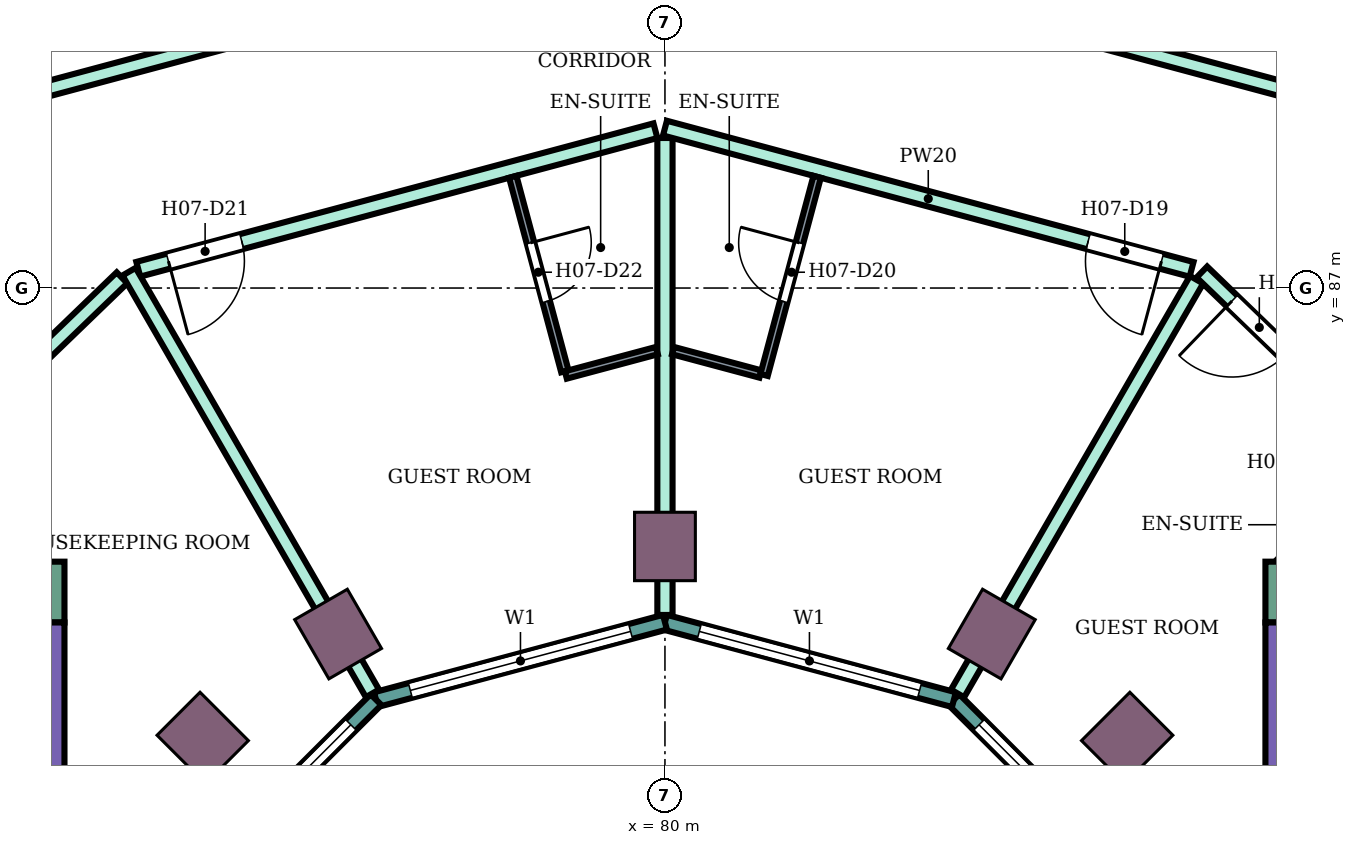
"""IFC4 building model, lengths in metres.
Left out: names, types, materials, properties, quantities, classifications, styles, units other than length and angle.
Written with IfcOpenShell. Run it as: python <this file> out.ifc"""

import sys

from ifc_helpers import new_model, si_unit, direction, frame, frame_2d, origin, origin_2d, place, context, subcontext, project, spatial, rectangle, extrude, element, fill, save


model = new_model("IFC4")
c1 = context("Model", 3, precision=1e-05, world=origin(), true_north=direction((0.0, 1.0)))
c2 = subcontext(c1, "Body", "Model", "MODEL_VIEW")
j1 = project(units=[si_unit("LENGTHUNIT", "METRE"), si_unit("PLANEANGLEUNIT", "RADIAN")], contexts=[c1])
p1 = place(None, origin())
s1 = spatial("IfcSite", under=j1, at=p1, CompositionType="ELEMENT")
p2 = place(p1, origin())
s2 = spatial("IfcBuilding", under=s1, at=p2, CompositionType="ELEMENT")
p3 = place(p2, frame((0.0, 0.0, 105.2)))
s3 = spatial("IfcBuildingStorey", under=s2, at=p3, CompositionType="ELEMENT", Elevation=105.2)
for number, where, z_axis, x_axis in (
    (1, (86.081, 81.081, 0.0), (0.0, 0.0, 1.0), (0.707, 0.707, 0.0)),
    (2, (84.3, 82.448, 0.0), (0.0, 0.0, 1.0), (0.5, 0.866, 0.0)),
    (3, (80.0, 83.6, 0.0), (0.0, 0.0, 1.0), (0.0, 1.0, 0.0)),
    (4, (75.7, 82.448, 0.0), (0.0, 0.0, 1.0), (-0.5, 0.866, 0.0)),
    (5, (73.919, 81.081, 0.0), (0.0, 0.0, 1.0), (-0.707, 0.707, 0.0)),
):
    element("IfcColumn", number, at=place(p3, frame(where, z_axis=z_axis, x_axis=x_axis)), inside=s3, PredefinedType="COLUMN", context=c2, shape_type="SweptSolid", body=[
        extrude(rectangle(XDim=0.9, YDim=0.8, at=origin_2d()), origin(), (0.0, 0.0, 1.0), 3.8),
    ])
p4 = place(p3, frame((87.9, 83.0, 0.0), z_axis=(0.0, 0.0, 1.0), x_axis=(1.0, 0.0, 0.0)))
e6 = element("IfcWall", 6, at=p4, inside=s3, PredefinedType="SHEAR", context=c2, shape_type="SweptSolid", body=[
    extrude(rectangle(XDim=14.7, YDim=0.8, at=frame_2d((7.35, 0.0))), origin(), (0.0, 0.0, 1.0), 3.45),
])
p5 = place(p4, frame((4.2, 0.0, 0.0)))
e7 = element("IfcOpeningElement", 7, at=p5, cuts=e6, PredefinedType="OPENING", context=c2, shape_type="SweptSolid", body=[
    extrude(rectangle(XDim=2.4, YDim=2.4, at=frame_2d((1.2, 1.2))), frame((0.0, 0.41, 0.0), z_axis=(0.0, -1.0, 0.0), x_axis=(1.0, 0.0, 0.0)), (0.0, 0.0, 1.0), 0.82),
])
p6 = place(p3, frame((88.125, 75.0, 0.0), z_axis=(0.0, 0.0, 1.0), x_axis=(0.0, 1.0, 0.0)))
e8 = element("IfcWall", 8, at=p6, inside=s3, PredefinedType="SHEAR", context=c2, shape_type="SweptSolid", body=[
    extrude(rectangle(XDim=7.6, YDim=0.45, at=frame_2d((3.8, 0.0))), origin(), (0.0, 0.0, 1.0), 3.45),
])
p7 = place(p3, frame((72.1, 83.0, 0.0), z_axis=(0.0, 0.0, 1.0), x_axis=(-1.0, 0.0, 0.0)))
e9 = element("IfcWall", 9, at=p7, inside=s3, PredefinedType="SHEAR", context=c2, shape_type="SweptSolid", body=[
    extrude(rectangle(XDim=14.7, YDim=0.8, at=frame_2d((7.35, 0.0))), origin(), (0.0, 0.0, 1.0), 3.45),
])
p8 = place(p7, frame((4.2, 0.0, 0.0)))
e10 = element("IfcOpeningElement", 10, at=p8, cuts=e9, PredefinedType="OPENING", context=c2, shape_type="SweptSolid", body=[
    extrude(rectangle(XDim=2.4, YDim=2.4, at=frame_2d((1.2, 1.2))), frame((0.0, 0.41, 0.0), z_axis=(0.0, -1.0, 0.0), x_axis=(1.0, 0.0, 0.0)), (0.0, 0.0, 1.0), 0.82),
])
p9 = place(p3, frame((71.875, 82.6, 0.0), z_axis=(0.0, 0.0, 1.0), x_axis=(0.0, -1.0, 0.0)))
e11 = element("IfcWall", 11, at=p9, inside=s3, PredefinedType="SHEAR", context=c2, shape_type="SweptSolid", body=[
    extrude(rectangle(XDim=7.6, YDim=0.45, at=frame_2d((3.8, 0.0))), origin(), (0.0, 0.0, 1.0), 3.45),
])
p10 = place(p3, frame((86.585, 78.802, 0.0), z_axis=(0.0, 0.0, 1.0), x_axis=(-0.707106781187, 0.707106781187, 0.0)))
e12 = element("IfcWall", 12, at=p10, inside=s3, PredefinedType="NOTDEFINED", context=c2, shape_type="SweptSolid", body=[
    extrude(rectangle(XDim=3.936, YDim=0.2, at=frame_2d((1.968, 0.0))), origin(), (0.0, 0.0, 1.0), 3.8),
])
p11 = place(p10, frame((0.468, 0.0, 0.9)))
e13 = element("IfcOpeningElement", 13, at=p11, cuts=e12, PredefinedType="OPENING", context=c2, shape_type="SweptSolid", body=[
    extrude(rectangle(XDim=3.0, YDim=2.3, at=frame_2d((1.5, 1.15))), frame((0.0, 0.11, 0.0), z_axis=(0.0, -1.0, 0.0), x_axis=(1.0, 0.0, 0.0)), (0.0, 0.0, 1.0), 0.22),
])
p12 = place(p3, frame((83.802, 81.585, 0.0), z_axis=(0.0, 0.0, 1.0), x_axis=(-0.965933654434, 0.258789828301, 0.0)))
e14 = element("IfcWall", 14, at=p12, inside=s3, PredefinedType="NOTDEFINED", context=c2, shape_type="SweptSolid", body=[
    extrude(rectangle(XDim=3.936, YDim=0.2, at=frame_2d((1.968, 0.0))), origin(), (0.0, 0.0, 1.0), 3.8),
])
p13 = place(p12, frame((0.468, 0.0, 0.9)))
e15 = element("IfcOpeningElement", 15, at=p13, cuts=e14, PredefinedType="OPENING", context=c2, shape_type="SweptSolid", body=[
    extrude(rectangle(XDim=3.0, YDim=2.3, at=frame_2d((1.5, 1.15))), frame((0.0, 0.11, 0.0), z_axis=(0.0, -1.0, 0.0), x_axis=(1.0, 0.0, 0.0)), (0.0, 0.0, 1.0), 0.22),
])
p14 = place(p3, frame((80.0, 82.604, 0.0), z_axis=(0.0, 0.0, 1.0), x_axis=(-0.965933654434, -0.258789828301, 0.0)))
e16 = element("IfcWall", 16, at=p14, inside=s3, PredefinedType="NOTDEFINED", context=c2, shape_type="SweptSolid", body=[
    extrude(rectangle(XDim=3.936, YDim=0.2, at=frame_2d((1.968, 0.0))), origin(), (0.0, 0.0, 1.0), 3.8),
])
p15 = place(p14, frame((0.468, 0.0, 0.9)))
e17 = element("IfcOpeningElement", 17, at=p15, cuts=e16, PredefinedType="OPENING", context=c2, shape_type="SweptSolid", body=[
    extrude(rectangle(XDim=3.0, YDim=2.3, at=frame_2d((1.5, 1.15))), frame((0.0, 0.11, 0.0), z_axis=(0.0, -1.0, 0.0), x_axis=(1.0, 0.0, 0.0)), (0.0, 0.0, 1.0), 0.22),
])
p16 = place(p3, frame((76.198, 81.585, 0.0), z_axis=(0.0, 0.0, 1.0), x_axis=(-0.707106781187, -0.707106781187, 0.0)))
e18 = element("IfcWall", 18, at=p16, inside=s3, PredefinedType="NOTDEFINED", context=c2, shape_type="SweptSolid", body=[
    extrude(rectangle(XDim=3.936, YDim=0.2, at=frame_2d((1.968, 0.0))), origin(), (0.0, 0.0, 1.0), 3.8),
])
p17 = place(p16, frame((0.468, 0.0, 0.9)))
e19 = element("IfcOpeningElement", 19, at=p17, cuts=e18, PredefinedType="OPENING", context=c2, shape_type="SweptSolid", body=[
    extrude(rectangle(XDim=3.0, YDim=2.3, at=frame_2d((1.5, 1.15))), frame((0.0, 0.11, 0.0), z_axis=(0.0, -1.0, 0.0), x_axis=(1.0, 0.0, 0.0)), (0.0, 0.0, 1.0), 0.22),
])
p18 = place(p3, frame((68.987, 83.4, 0.0), z_axis=(0.0, 0.0, 1.0), x_axis=(0.719547721855, 0.694442996922, 0.0)))
e20 = element("IfcWall", 20, at=p18, inside=s3, PredefinedType="PARTITIONING", context=c2, shape_type="SweptSolid", body=[
    extrude(rectangle(XDim=5.378, YDim=0.2, at=frame_2d((2.689, 0.0))), origin(), (0.0, 0.0, 1.0), 3.35),
])
p19 = place(p18, frame((2.294, 0.0, 0.0)))
e21 = element("IfcOpeningElement", 21, at=p19, cuts=e20, PredefinedType="OPENING", context=c2, shape_type="SweptSolid", body=[
    extrude(rectangle(XDim=0.9, YDim=2.1, at=frame_2d((0.45, 1.05))), frame((0.0, 0.11, 0.0), z_axis=(0.0, -1.0, 0.0), x_axis=(1.0, 0.0, 0.0)), (0.0, 0.0, 1.0), 0.22),
])
p20 = place(p3, frame((71.614, 89.55, 0.0), z_axis=(0.0, 0.0, 1.0), x_axis=(0.96597505802, 0.258635239832, 0.0)))
e22 = element("IfcWall", 22, at=p20, inside=s3, PredefinedType="PARTITIONING", context=c2, shape_type="SweptSolid", body=[
    extrude(rectangle(XDim=8.592, YDim=0.2, at=frame_2d((4.296, 0.0))), origin(), (0.0, 0.0, 1.0), 3.35),
])
p21 = place(p20, frame((4.865, 0.0, 0.0)))
e23 = element("IfcOpeningElement", 23, at=p21, cuts=e22, PredefinedType="OPENING", context=c2, shape_type="SweptSolid", body=[
    extrude(rectangle(XDim=1.0, YDim=2.1, at=frame_2d((0.5, 1.05))), frame((0.0, 0.11, 0.0), z_axis=(0.0, -1.0, 0.0), x_axis=(1.0, 0.0, 0.0)), (0.0, 0.0, 1.0), 0.22),
])
p22 = place(p20, frame((2.804, 0.0, 0.0)))
e24 = element("IfcOpeningElement", 24, at=p22, cuts=e22, PredefinedType="OPENING", context=c2, shape_type="SweptSolid", body=[
    extrude(rectangle(XDim=1.0, YDim=2.1, at=frame_2d((0.5, 1.05))), frame((0.0, 0.11, 0.0), z_axis=(0.0, -1.0, 0.0), x_axis=(1.0, 0.0, 0.0)), (0.0, 0.0, 1.0), 0.22),
])
p23 = place(p3, frame((73.071, 87.247, 0.0), z_axis=(0.0, 0.0, 1.0), x_axis=(0.965931651205, 0.258797305243, 0.0)))
e25 = element("IfcWall", 25, at=p23, inside=s3, PredefinedType="PARTITIONING", context=c2, shape_type="SweptSolid", body=[
    extrude(rectangle(XDim=7.043, YDim=0.2, at=frame_2d((3.521, 0.0))), origin(), (0.0, 0.0, 1.0), 3.35),
])
p24 = place(p23, frame((0.41, 0.0, 0.0)))
e26 = element("IfcOpeningElement", 26, at=p24, cuts=e25, PredefinedType="OPENING", context=c2, shape_type="SweptSolid", body=[
    extrude(rectangle(XDim=1.0, YDim=2.1, at=frame_2d((0.5, 1.05))), frame((0.0, 0.11, 0.0), z_axis=(0.0, -1.0, 0.0), x_axis=(1.0, 0.0, 0.0)), (0.0, 0.0, 1.0), 0.22),
])
p25 = place(p3, frame((72.95, 87.215, 0.0), z_axis=(0.0, 0.0, 1.0), x_axis=(0.499881928498, -0.866093561667, 0.0)))
e27 = element("IfcWall", 27, at=p25, inside=s3, PredefinedType="PARTITIONING", context=c2, shape_type="SweptSolid", body=[
    extrude(rectangle(XDim=6.405, YDim=0.2, at=frame_2d((3.203, 0.0))), origin(), (0.0, 0.0, 1.0), 3.35),
])
p26 = place(p3, frame((80.0, 82.699, 0.0), z_axis=(0.0, 0.0, 1.0), x_axis=(0.0, 1.0, 0.0)))
e28 = element("IfcWall", 28, at=p26, inside=s3, PredefinedType="PARTITIONING", context=c2, shape_type="SweptSolid", body=[
    extrude(rectangle(XDim=6.275, YDim=0.2, at=frame_2d((3.138, 0.0))), origin(), (0.0, 0.0, 1.0), 3.35),
])
p27 = place(p3, frame((80.0, 89.104, 0.0), z_axis=(0.0, 0.0, 1.0), x_axis=(0.965856548257, -0.259077455964, 0.0)))
e29 = element("IfcWall", 29, at=p27, inside=s3, PredefinedType="PARTITIONING", context=c2, shape_type="SweptSolid", body=[
    extrude(rectangle(XDim=7.173, YDim=0.2, at=frame_2d((3.586, 0.0))), origin(), (0.0, 0.0, 1.0), 3.35),
])
p28 = place(p27, frame((5.763, 0.0, 0.0)))
e30 = element("IfcOpeningElement", 30, at=p28, cuts=e29, PredefinedType="OPENING", context=c2, shape_type="SweptSolid", body=[
    extrude(rectangle(XDim=1.0, YDim=2.1, at=frame_2d((0.5, 1.05))), frame((0.0, 0.11, 0.0), z_axis=(0.0, -1.0, 0.0), x_axis=(1.0, 0.0, 0.0)), (0.0, 0.0, 1.0), 0.22),
])
p29 = place(p3, frame((80.0, 91.797, 0.0), z_axis=(0.0, 0.0, 1.0), x_axis=(0.965857042792, -0.259075612301, 0.0)))
e31 = element("IfcWall", 31, at=p29, inside=s3, PredefinedType="PARTITIONING", context=c2, shape_type="SweptSolid", body=[
    extrude(rectangle(XDim=8.602, YDim=0.2, at=frame_2d((4.301, 0.0))), origin(), (0.0, 0.0, 1.0), 3.35),
])
p30 = place(p29, frame((4.877, 0.0, 0.0)))
e32 = element("IfcOpeningElement", 32, at=p30, cuts=e31, PredefinedType="OPENING", context=c2, shape_type="SweptSolid", body=[
    extrude(rectangle(XDim=1.0, YDim=2.1, at=frame_2d((0.5, 1.05))), frame((0.0, 0.11, 0.0), z_axis=(0.0, -1.0, 0.0), x_axis=(1.0, 0.0, 0.0)), (0.0, 0.0, 1.0), 0.22),
])
p31 = place(p29, frame((1.683, 0.0, 0.0)))
e33 = element("IfcOpeningElement", 33, at=p31, cuts=e31, PredefinedType="OPENING", context=c2, shape_type="SweptSolid", body=[
    extrude(rectangle(XDim=1.0, YDim=2.1, at=frame_2d((0.5, 1.05))), frame((0.0, 0.11, 0.0), z_axis=(0.0, -1.0, 0.0), x_axis=(1.0, 0.0, 0.0)), (0.0, 0.0, 1.0), 0.22),
])
p32 = place(p3, frame((83.85, 81.667, 0.0), z_axis=(0.0, 0.0, 1.0), x_axis=(0.500224530691, 0.865895732115, 0.0)))
e34 = element("IfcWall", 34, at=p32, inside=s3, PredefinedType="PARTITIONING", context=c2, shape_type="SweptSolid", body=[
    extrude(rectangle(XDim=6.285, YDim=0.2, at=frame_2d((3.143, 0.0))), origin(), (0.0, 0.0, 1.0), 3.35),
])
p33 = place(p3, frame((87.064, 87.211, 0.0), z_axis=(0.0, 0.0, 1.0), x_axis=(0.719540958932, -0.694450004262, 0.0)))
e35 = element("IfcWall", 35, at=p33, inside=s3, PredefinedType="PARTITIONING", context=c2, shape_type="SweptSolid", body=[
    extrude(rectangle(XDim=5.488, YDim=0.2, at=frame_2d((2.744, 0.0))), origin(), (0.0, 0.0, 1.0), 3.35),
])
p34 = place(p33, frame((0.55, 0.0, 0.0)))
e36 = element("IfcOpeningElement", 36, at=p34, cuts=e35, PredefinedType="OPENING", context=c2, shape_type="SweptSolid", body=[
    extrude(rectangle(XDim=1.0, YDim=2.1, at=frame_2d((0.5, 1.05))), frame((0.0, 0.11, 0.0), z_axis=(0.0, -1.0, 0.0), x_axis=(1.0, 0.0, 0.0)), (0.0, 0.0, 1.0), 0.22),
])
p35 = place(p3, frame((77.998, 88.463, 0.0), z_axis=(0.0, 0.0, 1.0), x_axis=(0.258677737588, -0.965963678446, 0.0)))
e37 = element("IfcWall", 37, at=p35, inside=s3, PredefinedType="PARTITIONING", context=c2, shape_type="SweptSolid", body=[
    extrude(rectangle(XDim=2.649, YDim=0.1, at=frame_2d((1.325, 0.0))), origin(), (0.0, 0.0, 1.0), 3.35),
])
p36 = place(p35, frame((0.9, 0.0, 0.0)))
e38 = element("IfcOpeningElement", 38, at=p36, cuts=e37, PredefinedType="OPENING", context=c2, shape_type="SweptSolid", body=[
    extrude(rectangle(XDim=0.8, YDim=2.1, at=frame_2d((0.4, 1.05))), frame((0.0, 0.06, 0.0), z_axis=(0.0, -1.0, 0.0), x_axis=(1.0, 0.0, 0.0)), (0.0, 0.0, 1.0), 0.12),
])
p37 = place(p3, frame((78.696, 85.856, 0.0), z_axis=(0.0, 0.0, 1.0), x_axis=(0.966002513606, 0.258532674351, 0.0)))
e39 = element("IfcWall", 39, at=p37, inside=s3, PredefinedType="PARTITIONING", context=c2, shape_type="SweptSolid", body=[
    extrude(rectangle(XDim=1.24, YDim=0.1, at=frame_2d((0.62, 0.0))), origin(), (0.0, 0.0, 1.0), 3.35),
])
p38 = place(p3, frame((80.106, 86.177, 0.0), z_axis=(0.0, 0.0, 1.0), x_axis=(0.966002973184, -0.258530957139, 0.0)))
e40 = element("IfcWall", 40, at=p38, inside=s3, PredefinedType="PARTITIONING", context=c2, shape_type="SweptSolid", body=[
    extrude(rectangle(XDim=1.19, YDim=0.1, at=frame_2d((0.595, 0.0))), origin(), (0.0, 0.0, 1.0), 3.35),
])
p39 = place(p3, frame((81.304, 85.856, 0.0), z_axis=(0.0, 0.0, 1.0), x_axis=(0.25867580527, 0.965964195904, 0.0)))
e41 = element("IfcWall", 41, at=p39, inside=s3, PredefinedType="PARTITIONING", context=c2, shape_type="SweptSolid", body=[
    extrude(rectangle(XDim=2.699, YDim=0.1, at=frame_2d((1.35, 0.0))), origin(), (0.0, 0.0, 1.0), 3.35),
])
p40 = place(p39, frame((1.0, 0.0, 0.0)))
e42 = element("IfcOpeningElement", 42, at=p40, cuts=e41, PredefinedType="OPENING", context=c2, shape_type="SweptSolid", body=[
    extrude(rectangle(XDim=0.8, YDim=2.1, at=frame_2d((0.4, 1.05))), frame((0.0, 0.06, 0.0), z_axis=(0.0, -1.0, 0.0), x_axis=(1.0, 0.0, 0.0)), (0.0, 0.0, 1.0), 0.12),
])
p41 = place(p11, origin())
e43 = element("IfcWindow", 43, at=p41, inside=s3, PartitioningType="SINGLE_PANEL", PredefinedType="WINDOW", context=c2, shape_type="SweptSolid", body=[
    extrude(rectangle(XDim=3.0, YDim=2.3, at=frame_2d((1.5, 1.15))), frame((0.0, 0.03, 0.0), z_axis=(0.0, -1.0, 0.0), x_axis=(1.0, 0.0, 0.0)), (0.0, 0.0, 1.0), 0.06),
])
fill(e13, e43)
p42 = place(p13, origin())
e44 = element("IfcWindow", 44, at=p42, inside=s3, PartitioningType="SINGLE_PANEL", PredefinedType="WINDOW", context=c2, shape_type="SweptSolid", body=[
    extrude(rectangle(XDim=3.0, YDim=2.3, at=frame_2d((1.5, 1.15))), frame((0.0, 0.03, 0.0), z_axis=(0.0, -1.0, 0.0), x_axis=(1.0, 0.0, 0.0)), (0.0, 0.0, 1.0), 0.06),
])
fill(e15, e44)
p43 = place(p15, origin())
e45 = element("IfcWindow", 45, at=p43, inside=s3, PartitioningType="SINGLE_PANEL", PredefinedType="WINDOW", context=c2, shape_type="SweptSolid", body=[
    extrude(rectangle(XDim=3.0, YDim=2.3, at=frame_2d((1.5, 1.15))), frame((0.0, 0.03, 0.0), z_axis=(0.0, -1.0, 0.0), x_axis=(1.0, 0.0, 0.0)), (0.0, 0.0, 1.0), 0.06),
])
fill(e17, e45)
p44 = place(p17, origin())
e46 = element("IfcWindow", 46, at=p44, inside=s3, PartitioningType="SINGLE_PANEL", PredefinedType="WINDOW", context=c2, shape_type="SweptSolid", body=[
    extrude(rectangle(XDim=3.0, YDim=2.3, at=frame_2d((1.5, 1.15))), frame((0.0, 0.03, 0.0), z_axis=(0.0, -1.0, 0.0), x_axis=(1.0, 0.0, 0.0)), (0.0, 0.0, 1.0), 0.06),
])
fill(e19, e46)
p45 = place(p34, frame((1.0, 0.0, 0.0), z_axis=(0.0, 0.0, 1.0), x_axis=(-1.0, 0.0, 0.0)))
e47 = element("IfcDoor", 47, at=p45, inside=s3, OperationType="SINGLE_SWING_RIGHT", PredefinedType="DOOR", context=c2, shape_type="SweptSolid", body=[
    extrude(rectangle(XDim=1.0, YDim=2.1, at=frame_2d((0.5, 1.05))), frame((0.0, 0.025, 0.0), z_axis=(0.0, -1.0, 0.0), x_axis=(1.0, 0.0, 0.0)), (0.0, 0.0, 1.0), 0.05),
])
fill(e36, e47)
p46 = place(p28, frame((1.0, 0.0, 0.0), z_axis=(0.0, 0.0, 1.0), x_axis=(-1.0, 0.0, 0.0)))
e48 = element("IfcDoor", 48, at=p46, inside=s3, OperationType="SINGLE_SWING_LEFT", PredefinedType="DOOR", context=c2, shape_type="SweptSolid", body=[
    extrude(rectangle(XDim=1.0, YDim=2.1, at=frame_2d((0.5, 1.05))), frame((0.0, 0.025, 0.0), z_axis=(0.0, -1.0, 0.0), x_axis=(1.0, 0.0, 0.0)), (0.0, 0.0, 1.0), 0.05),
])
fill(e30, e48)
p47 = place(p40, origin())
e49 = element("IfcDoor", 49, at=p47, inside=s3, OperationType="SINGLE_SWING_RIGHT", PredefinedType="DOOR", context=c2, shape_type="SweptSolid", body=[
    extrude(rectangle(XDim=0.8, YDim=2.1, at=frame_2d((0.4, 1.05))), frame((0.0, 0.025, 0.0), z_axis=(0.0, -1.0, 0.0), x_axis=(1.0, 0.0, 0.0)), (0.0, 0.0, 1.0), 0.05),
])
fill(e42, e49)
p48 = place(p24, frame((1.0, 0.0, 0.0), z_axis=(0.0, 0.0, 1.0), x_axis=(-1.0, 0.0, 0.0)))
e50 = element("IfcDoor", 50, at=p48, inside=s3, OperationType="SINGLE_SWING_RIGHT", PredefinedType="DOOR", context=c2, shape_type="SweptSolid", body=[
    extrude(rectangle(XDim=1.0, YDim=2.1, at=frame_2d((0.5, 1.05))), frame((0.0, 0.025, 0.0), z_axis=(0.0, -1.0, 0.0), x_axis=(1.0, 0.0, 0.0)), (0.0, 0.0, 1.0), 0.05),
])
fill(e26, e50)
p49 = place(p36, origin())
e51 = element("IfcDoor", 51, at=p49, inside=s3, OperationType="SINGLE_SWING_LEFT", PredefinedType="DOOR", context=c2, shape_type="SweptSolid", body=[
    extrude(rectangle(XDim=0.8, YDim=2.1, at=frame_2d((0.4, 1.05))), frame((0.0, 0.025, 0.0), z_axis=(0.0, -1.0, 0.0), x_axis=(1.0, 0.0, 0.0)), (0.0, 0.0, 1.0), 0.05),
])
fill(e38, e51)
save(model, sys.argv[1])
